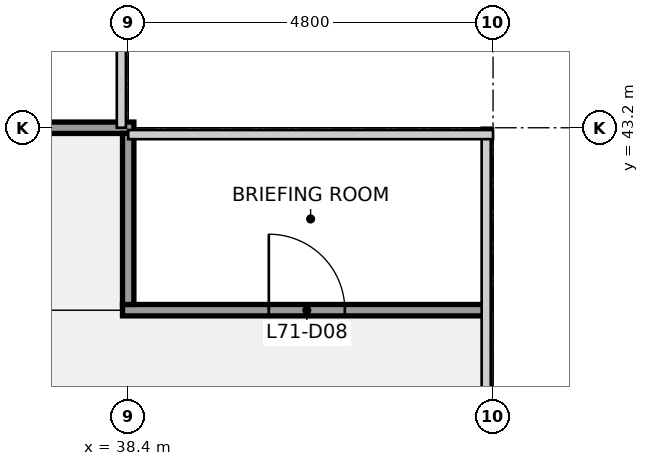
"""IFC4 building model, lengths in metres.
Left out: names, types, materials, properties, quantities, classifications, styles, units other than length and angle.
Written with IfcOpenShell. Run it as: python <this file> out.ifc"""

import sys

from ifc_helpers import new_model, si_unit, direction, frame, frame_2d, origin, place, context, subcontext, project, spatial, rectangle, extrude, element, fill, save


model = new_model("IFC4")
c1 = context("Model", 3, precision=1e-05, world=origin(), true_north=direction((0.0, 1.0)))
c2 = subcontext(c1, "Body", "Model", "MODEL_VIEW")
j1 = project(units=[si_unit("LENGTHUNIT", "METRE"), si_unit("PLANEANGLEUNIT", "RADIAN")], contexts=[c1])
p1 = place(None, origin())
s1 = spatial("IfcSite", under=j1, at=p1, CompositionType="ELEMENT")
p2 = place(p1, origin())
s2 = spatial("IfcBuilding", under=s1, at=p2, CompositionType="ELEMENT")
p3 = place(p2, frame((0.0, 0.0, 322.3)))
s3 = spatial("IfcBuildingStorey", under=s2, at=p3, CompositionType="ELEMENT", Elevation=322.3)
p4 = place(p3, frame((38.325, 40.8, 0.0), z_axis=(0.0, 0.0, 1.0), x_axis=(1.0, 0.0, 0.0)))
e1 = element("IfcWall", 1, at=p4, inside=s3, PredefinedType="PARTITIONING", context=c2, shape_type="SweptSolid", body=[
    extrude(rectangle(XDim=4.775, YDim=0.15, at=frame_2d((2.388, 0.0))), origin(), (0.0, 0.0, 1.0), 2.849),
])
p5 = place(p4, frame((1.925, 0.0, 0.0)))
e2 = element("IfcOpeningElement", 2, at=p5, cuts=e1, PredefinedType="OPENING", context=c2, shape_type="SweptSolid", body=[
    extrude(rectangle(XDim=1.0, YDim=2.1, at=frame_2d((0.5, 1.05))), frame((0.0, 0.085, 0.0), z_axis=(0.0, -1.0, 0.0), x_axis=(1.0, 0.0, 0.0)), (0.0, 0.0, 1.0), 0.17),
])
p6 = place(p3, frame((19.125, 43.2, 0.0), z_axis=(0.0, 0.0, 1.0), x_axis=(1.0, 0.0, 0.0)))
e3 = element("IfcWall", 3, at=p6, inside=s3, PredefinedType="PARTITIONING", context=c2, shape_type="SweptSolid", body=[
    extrude(rectangle(XDim=19.35, YDim=0.15, at=frame_2d((9.675, 0.0))), origin(), (0.0, 0.0, 1.0), 2.849),
])
p7 = place(p6, frame((9.175, 0.0, 0.0)))
e4 = element("IfcOpeningElement", 4, at=p7, cuts=e3, PredefinedType="OPENING", context=c2, shape_type="SweptSolid", body=[
    extrude(rectangle(XDim=1.0, YDim=2.1, at=frame_2d((0.5, 1.05))), frame((0.0, 0.085, 0.0), z_axis=(0.0, -1.0, 0.0), x_axis=(1.0, 0.0, 0.0)), (0.0, 0.0, 1.0), 0.17),
])
p8 = place(p3, frame((38.4, 40.875, 0.0), z_axis=(0.0, 0.0, 1.0), x_axis=(0.0, 1.0, 0.0)))
e5 = element("IfcWall", 5, at=p8, inside=s3, PredefinedType="PARTITIONING", context=c2, shape_type="SweptSolid", body=[
    extrude(rectangle(XDim=2.25, YDim=0.15, at=frame_2d((1.125, 0.0))), origin(), (0.0, 0.0, 1.0), 2.849),
])
p9 = place(p5, origin())
e6 = element("IfcDoor", 6, at=p9, inside=s3, OperationType="SINGLE_SWING_LEFT", PredefinedType="DOOR", context=c2, shape_type="SweptSolid", body=[
    extrude(rectangle(XDim=1.0, YDim=2.1, at=frame_2d((0.5, 1.05))), frame((0.0, 0.025, 0.0), z_axis=(0.0, -1.0, 0.0), x_axis=(1.0, 0.0, 0.0)), (0.0, 0.0, 1.0), 0.05),
])
fill(e2, e6)
save(model, sys.argv[1])
